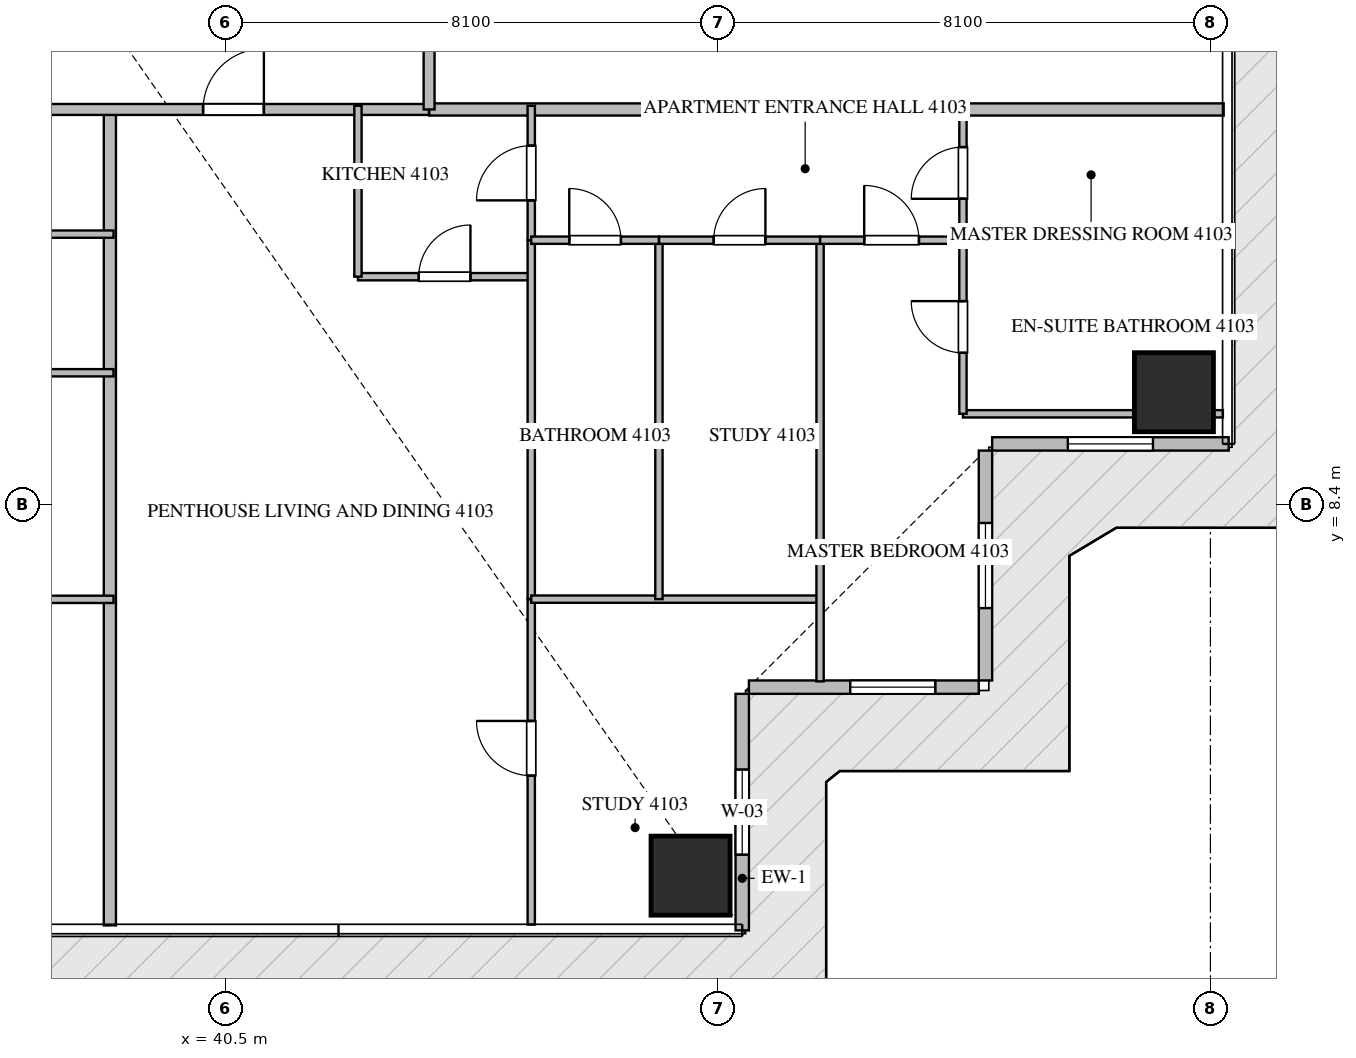
"""IFC4 building model, lengths in metres.
Left out: names, types, materials, properties, quantities, classifications, styles, units other than length and angle.
Written with IfcOpenShell. Run it as: python <this file> out.ifc"""

import sys

from ifc_helpers import new_model, si_unit, direction, frame, frame_2d, origin, origin_2d, place, context, subcontext, project, spatial, rectangle, extrude, source, transform, mapped, element, fill, save


model = new_model("IFC4")
c1 = context("Model", 3, precision=1e-05, world=origin(), true_north=direction((0.0, 1.0)))
c2 = subcontext(c1, "Body", "Model", "MODEL_VIEW")
j1 = project(units=[si_unit("LENGTHUNIT", "METRE"), si_unit("PLANEANGLEUNIT", "RADIAN")], contexts=[c1])
p1 = place(None, origin())
s1 = spatial("IfcSite", under=j1, at=p1, CompositionType="ELEMENT")
p2 = place(p1, origin())
s2 = spatial("IfcBuilding", under=s1, at=p2, CompositionType="ELEMENT")
p3 = place(p2, frame((0.0, 0.0, 165.15)))
s3 = spatial("IfcBuildingStorey", under=s2, at=p3, CompositionType="ELEMENT", Elevation=165.15)
m1 = source(origin(), c2, "Body", "SweptSolid", [
    extrude(rectangle(XDim=1.3, YDim=1.3, at=origin_2d()), origin(), (0.0, 0.0, 1.0), 3.75),
])
for number, where, z_axis, x_axis in (
    (1, (48.15, 2.3, -0.26), (0.0, 0.0, 1.0), (1.0, 0.0, 0.0)),
    (2, (56.1, 10.25, -0.26), (0.0, 0.0, 1.0), (1.0, 0.0, 0.0)),
):
    element("IfcColumn", number, at=place(p3, frame(where, z_axis=z_axis, x_axis=x_axis)), inside=s3, PredefinedType="COLUMN", context=c2, shape_type="MappedRepresentation", body=[
        mapped(m1, transform((0.0, 0.0, 0.0), scale=1.0)),
    ])
p4 = place(p3, frame((49.0, 1.4, 0.0), z_axis=(0.0, 0.0, 1.0), x_axis=(0.0, 1.0, 0.0)))
e3 = element("IfcWall", 3, at=p4, inside=s3, PredefinedType="ELEMENTEDWALL", context=c2, shape_type="SweptSolid", body=[
    extrude(rectangle(XDim=3.89, YDim=0.22, at=frame_2d((1.945, 0.0))), origin(), (0.0, 0.0, 1.0), 3.475),
])
p5 = place(p4, frame((1.245, 0.0, 0.65)))
e4 = element("IfcOpeningElement", 4, at=p5, cuts=e3, PredefinedType="OPENING", context=c2, shape_type="SweptSolid", body=[
    extrude(rectangle(XDim=1.4, YDim=2.05, at=frame_2d((0.7, 1.025))), frame((0.0, 0.12, 0.0), z_axis=(0.0, -1.0, 0.0), x_axis=(1.0, 0.0, 0.0)), (0.0, 0.0, 1.0), 0.24),
])
p6 = place(p3, frame((49.11, 5.4, 0.0), z_axis=(0.0, 0.0, 1.0), x_axis=(1.0, 0.0, 0.0)))
e5 = element("IfcWall", 5, at=p6, inside=s3, PredefinedType="ELEMENTEDWALL", context=c2, shape_type="SweptSolid", body=[
    extrude(rectangle(XDim=3.78, YDim=0.22, at=frame_2d((1.89, 0.0))), origin(), (0.0, 0.0, 1.0), 3.475),
])
p7 = place(p6, frame((1.666, 0.0, 0.65)))
e6 = element("IfcOpeningElement", 6, at=p7, cuts=e5, PredefinedType="OPENING", context=c2, shape_type="SweptSolid", body=[
    extrude(rectangle(XDim=1.4, YDim=2.05, at=frame_2d((0.7, 1.025))), frame((0.0, 0.12, 0.0), z_axis=(0.0, -1.0, 0.0), x_axis=(1.0, 0.0, 0.0)), (0.0, 0.0, 1.0), 0.24),
])
p8 = place(p3, frame((53.0, 5.51, 0.0), z_axis=(0.0, 0.0, 1.0), x_axis=(0.0, 1.0, 0.0)))
e7 = element("IfcWall", 7, at=p8, inside=s3, PredefinedType="ELEMENTEDWALL", context=c2, shape_type="SweptSolid", body=[
    extrude(rectangle(XDim=3.78, YDim=0.22, at=frame_2d((1.89, 0.0))), origin(), (0.0, 0.0, 1.0), 3.475),
])
p9 = place(p8, frame((1.19, 0.0, 0.65)))
e8 = element("IfcOpeningElement", 8, at=p9, cuts=e7, PredefinedType="OPENING", context=c2, shape_type="SweptSolid", body=[
    extrude(rectangle(XDim=1.4, YDim=2.05, at=frame_2d((0.7, 1.025))), frame((0.0, 0.12, 0.0), z_axis=(0.0, -1.0, 0.0), x_axis=(1.0, 0.0, 0.0)), (0.0, 0.0, 1.0), 0.24),
])
p10 = place(p3, frame((53.11, 9.4, 0.0), z_axis=(0.0, 0.0, 1.0), x_axis=(1.0, 0.0, 0.0)))
e9 = element("IfcWall", 9, at=p10, inside=s3, PredefinedType="ELEMENTEDWALL", context=c2, shape_type="SweptSolid", body=[
    extrude(rectangle(XDim=3.89, YDim=0.22, at=frame_2d((1.945, 0.0))), origin(), (0.0, 0.0, 1.0), 3.475),
])
p11 = place(p10, frame((1.245, 0.0, 0.65)))
e10 = element("IfcOpeningElement", 10, at=p11, cuts=e9, PredefinedType="OPENING", context=c2, shape_type="SweptSolid", body=[
    extrude(rectangle(XDim=1.4, YDim=2.05, at=frame_2d((0.7, 1.025))), frame((0.0, 0.12, 0.0), z_axis=(0.0, -1.0, 0.0), x_axis=(1.0, 0.0, 0.0)), (0.0, 0.0, 1.0), 0.24),
])
p12 = place(p3, frame((38.6, 1.482, 0.0), z_axis=(0.0, 0.0, 1.0), x_axis=(0.0, 1.0, 0.0)))
e11 = element("IfcWall", 11, at=p12, inside=s3, PredefinedType="PARTITIONING", context=c2, shape_type="SweptSolid", body=[
    extrude(rectangle(XDim=13.418, YDim=0.2, at=frame_2d((6.709, 0.0))), origin(), (0.0, 0.0, 1.0), 3.49),
])
p13 = place(p3, frame((43.85, 14.9, 0.0), z_axis=(0.0, 0.0, 1.0), x_axis=(1.0, 0.0, 0.0)))
e12 = element("IfcWall", 12, at=p13, inside=s3, PredefinedType="PARTITIONING", context=c2, shape_type="SweptSolid", body=[
    extrude(rectangle(XDim=13.068, YDim=0.2, at=frame_2d((6.534, 0.0))), origin(), (0.0, 0.0, 1.0), 3.49),
])
p14 = place(p3, frame((20.952, 14.9, 0.0), z_axis=(0.0, 0.0, 1.0), x_axis=(1.0, 0.0, 0.0)))
e13 = element("IfcWall", 13, at=p14, inside=s3, PredefinedType="PARTITIONING", context=c2, shape_type="SweptSolid", body=[
    extrude(rectangle(XDim=22.896, YDim=0.18, at=frame_2d((11.448, 0.0))), origin(), (0.0, 0.0, 1.0), 3.49),
])
p15 = place(p14, frame((2.387, 0.0, 0.0)))
e14 = element("IfcOpeningElement", 14, at=p15, cuts=e13, PredefinedType="OPENING", context=c2, shape_type="SweptSolid", body=[
    extrude(rectangle(XDim=1.0, YDim=2.15, at=frame_2d((0.5, 1.075))), frame((0.0, 0.1, 0.0), z_axis=(0.0, -1.0, 0.0), x_axis=(1.0, 0.0, 0.0)), (0.0, 0.0, 1.0), 0.2),
])
p16 = place(p14, frame((6.788, 0.0, 0.0)))
e15 = element("IfcOpeningElement", 15, at=p16, cuts=e13, PredefinedType="OPENING", context=c2, shape_type="SweptSolid", body=[
    extrude(rectangle(XDim=1.0, YDim=2.15, at=frame_2d((0.5, 1.075))), frame((0.0, 0.1, 0.0), z_axis=(0.0, -1.0, 0.0), x_axis=(1.0, 0.0, 0.0)), (0.0, 0.0, 1.0), 0.2),
])
p17 = place(p14, frame((19.181, 0.0, 0.0)))
e16 = element("IfcOpeningElement", 16, at=p17, cuts=e13, PredefinedType="OPENING", context=c2, shape_type="SweptSolid", body=[
    extrude(rectangle(XDim=1.0, YDim=2.15, at=frame_2d((0.5, 1.075))), frame((0.0, 0.1, 0.0), z_axis=(0.0, -1.0, 0.0), x_axis=(1.0, 0.0, 0.0)), (0.0, 0.0, 1.0), 0.2),
])
p18 = place(p3, frame((43.85, 14.9, 0.0), z_axis=(0.0, 0.0, 1.0), x_axis=(0.0, 1.0, 0.0)))
e17 = element("IfcWall", 17, at=p18, inside=s3, PredefinedType="PARTITIONING", context=c2, shape_type="SweptSolid", body=[
    extrude(rectangle(XDim=18.7, YDim=0.18, at=frame_2d((9.35, 0.0))), origin(), (0.0, 0.0, 1.0), 3.49),
])
p19 = place(p18, frame((1.805, 0.0, 0.0)))
e18 = element("IfcOpeningElement", 18, at=p19, cuts=e17, PredefinedType="OPENING", context=c2, shape_type="SweptSolid", body=[
    extrude(rectangle(XDim=1.0, YDim=2.15, at=frame_2d((0.5, 1.075))), frame((0.0, 0.1, 0.0), z_axis=(0.0, -1.0, 0.0), x_axis=(1.0, 0.0, 0.0)), (0.0, 0.0, 1.0), 0.2),
])
for number, where, z_axis, x_axis in (
    (19, (30.66, 6.844, 0.0), (0.0, 0.0, 1.0), (1.0, 0.0, 0.0)),
    (20, (30.66, 10.57, 0.0), (0.0, 0.0, 1.0), (1.0, 0.0, 0.0)),
    (21, (30.66, 12.85, 0.0), (0.0, 0.0, 1.0), (1.0, 0.0, 0.0)),
):
    element("IfcWall", number, at=place(p3, frame(where, z_axis=z_axis, x_axis=x_axis)), inside=s3, PredefinedType="PARTITIONING", context=c2, shape_type="SweptSolid", body=[
        extrude(rectangle(XDim=8.0, YDim=0.12, at=frame_2d((4.0, 0.0))), origin(), (0.0, 0.0, 1.0), 3.49),
    ])
p20 = place(p3, frame((42.68, 12.15, 0.0), z_axis=(0.0, 0.0, 1.0), x_axis=(1.0, 0.0, 0.0)))
e22 = element("IfcWall", 22, at=p20, inside=s3, PredefinedType="PARTITIONING", context=c2, shape_type="SweptSolid", body=[
    extrude(rectangle(XDim=2.85, YDim=0.12, at=frame_2d((1.425, 0.0))), origin(), (0.0, 0.0, 1.0), 3.49),
])
p21 = place(p20, frame((1.0, 0.0, 0.0)))
e23 = element("IfcOpeningElement", 23, at=p21, cuts=e22, PredefinedType="OPENING", context=c2, shape_type="SweptSolid", body=[
    extrude(rectangle(XDim=0.85, YDim=2.1, at=frame_2d((0.425, 1.05))), frame((0.0, 0.07, 0.0), z_axis=(0.0, -1.0, 0.0), x_axis=(1.0, 0.0, 0.0)), (0.0, 0.0, 1.0), 0.14),
])
p22 = place(p3, frame((42.68, 12.15, 0.0), z_axis=(0.0, 0.0, 1.0), x_axis=(0.0, 1.0, 0.0)))
e24 = element("IfcWall", 24, at=p22, inside=s3, PredefinedType="PARTITIONING", context=c2, shape_type="SweptSolid", body=[
    extrude(rectangle(XDim=2.81, YDim=0.12, at=frame_2d((1.405, 0.0))), origin(), (0.0, 0.0, 1.0), 3.49),
])
p23 = place(p3, frame((45.53, 12.75, 0.0), z_axis=(0.0, 0.0, 1.0), x_axis=(0.0, 1.0, 0.0)))
e25 = element("IfcWall", 25, at=p23, inside=s3, PredefinedType="PARTITIONING", context=c2, shape_type="SweptSolid", body=[
    extrude(rectangle(XDim=2.21, YDim=0.12, at=frame_2d((1.105, 0.0))), origin(), (0.0, 0.0, 1.0), 3.49),
])
p24 = place(p23, frame((0.655, 0.0, 0.0)))
e26 = element("IfcOpeningElement", 26, at=p24, cuts=e25, PredefinedType="OPENING", context=c2, shape_type="SweptSolid", body=[
    extrude(rectangle(XDim=0.9, YDim=2.1, at=frame_2d((0.45, 1.05))), frame((0.0, 0.07, 0.0), z_axis=(0.0, -1.0, 0.0), x_axis=(1.0, 0.0, 0.0)), (0.0, 0.0, 1.0), 0.14),
])
p25 = place(p3, frame((45.53, 1.495, 0.0), z_axis=(0.0, 0.0, 1.0), x_axis=(0.0, 1.0, 0.0)))
e27 = element("IfcWall", 27, at=p25, inside=s3, PredefinedType="PARTITIONING", context=c2, shape_type="SweptSolid", body=[
    extrude(rectangle(XDim=5.352, YDim=0.12, at=frame_2d((2.676, 0.0))), origin(), (0.0, 0.0, 1.0), 3.49),
])
p26 = place(p25, frame((2.449, 0.0, 0.0)))
e28 = element("IfcOpeningElement", 28, at=p26, cuts=e27, PredefinedType="OPENING", context=c2, shape_type="SweptSolid", body=[
    extrude(rectangle(XDim=0.9, YDim=2.1, at=frame_2d((0.45, 1.05))), frame((0.0, 0.07, 0.0), z_axis=(0.0, -1.0, 0.0), x_axis=(1.0, 0.0, 0.0)), (0.0, 0.0, 1.0), 0.14),
])
p27 = place(p3, frame((45.53, 6.849, 0.0), z_axis=(0.0, 0.0, 1.0), x_axis=(0.0, 1.0, 0.0)))
e29 = element("IfcWall", 29, at=p27, inside=s3, PredefinedType="PARTITIONING", context=c2, shape_type="SweptSolid", body=[
    extrude(rectangle(XDim=5.899, YDim=0.12, at=frame_2d((2.949, 0.0))), origin(), (0.0, 0.0, 1.0), 3.49),
])
p28 = place(p3, frame((45.53, 6.847, 0.0), z_axis=(0.0, 0.0, 1.0), x_axis=(1.0, 0.0, 0.0)))
e30 = element("IfcWall", 30, at=p28, inside=s3, PredefinedType="PARTITIONING", context=c2, shape_type="SweptSolid", body=[
    extrude(rectangle(XDim=4.75, YDim=0.12, at=frame_2d((2.375, 0.0))), origin(), (0.0, 0.0, 1.0), 3.49),
])
p29 = place(p3, frame((50.28, 5.495, 0.0), z_axis=(0.0, 0.0, 1.0), x_axis=(0.0, 1.0, 0.0)))
e31 = element("IfcWall", 31, at=p29, inside=s3, PredefinedType="PARTITIONING", context=c2, shape_type="SweptSolid", body=[
    extrude(rectangle(XDim=7.255, YDim=0.12, at=frame_2d((3.627, 0.0))), origin(), (0.0, 0.0, 1.0), 3.49),
])
p30 = place(p3, frame((47.63, 6.847, 0.0), z_axis=(0.0, 0.0, 1.0), x_axis=(0.0, 1.0, 0.0)))
e32 = element("IfcWall", 32, at=p30, inside=s3, PredefinedType="PARTITIONING", context=c2, shape_type="SweptSolid", body=[
    extrude(rectangle(XDim=5.903, YDim=0.12, at=frame_2d((2.952, 0.0))), origin(), (0.0, 0.0, 1.0), 3.49),
])
p31 = place(p3, frame((45.53, 12.75, 0.0), z_axis=(0.0, 0.0, 1.0), x_axis=(1.0, 0.0, 0.0)))
e33 = element("IfcWall", 33, at=p31, inside=s3, PredefinedType="PARTITIONING", context=c2, shape_type="SweptSolid", body=[
    extrude(rectangle(XDim=2.1, YDim=0.12, at=frame_2d((1.05, 0.0))), origin(), (0.0, 0.0, 1.0), 3.49),
])
p32 = place(p31, frame((0.625, 0.0, 0.0)))
e34 = element("IfcOpeningElement", 34, at=p32, cuts=e33, PredefinedType="OPENING", context=c2, shape_type="SweptSolid", body=[
    extrude(rectangle(XDim=0.85, YDim=2.1, at=frame_2d((0.425, 1.05))), frame((0.0, 0.07, 0.0), z_axis=(0.0, -1.0, 0.0), x_axis=(1.0, 0.0, 0.0)), (0.0, 0.0, 1.0), 0.14),
])
p33 = place(p3, frame((47.632, 12.75, 0.0), z_axis=(0.0, 0.0, 1.0), x_axis=(1.0, 0.0, 0.0)))
e35 = element("IfcWall", 35, at=p33, inside=s3, PredefinedType="PARTITIONING", context=c2, shape_type="SweptSolid", body=[
    extrude(rectangle(XDim=2.648, YDim=0.12, at=frame_2d((1.324, 0.0))), origin(), (0.0, 0.0, 1.0), 3.49),
])
p34 = place(p33, frame((0.899, 0.0, 0.0)))
e36 = element("IfcOpeningElement", 36, at=p34, cuts=e35, PredefinedType="OPENING", context=c2, shape_type="SweptSolid", body=[
    extrude(rectangle(XDim=0.85, YDim=2.1, at=frame_2d((0.425, 1.05))), frame((0.0, 0.07, 0.0), z_axis=(0.0, -1.0, 0.0), x_axis=(1.0, 0.0, 0.0)), (0.0, 0.0, 1.0), 0.14),
])
p35 = place(p3, frame((50.282, 12.75, 0.0), z_axis=(0.0, 0.0, 1.0), x_axis=(1.0, 0.0, 0.0)))
e37 = element("IfcWall", 37, at=p35, inside=s3, PredefinedType="PARTITIONING", context=c2, shape_type="SweptSolid", body=[
    extrude(rectangle(XDim=2.348, YDim=0.12, at=frame_2d((1.174, 0.0))), origin(), (0.0, 0.0, 1.0), 3.49),
])
p36 = place(p35, frame((0.724, 0.0, 0.0)))
e38 = element("IfcOpeningElement", 38, at=p36, cuts=e37, PredefinedType="OPENING", context=c2, shape_type="SweptSolid", body=[
    extrude(rectangle(XDim=0.9, YDim=2.1, at=frame_2d((0.45, 1.05))), frame((0.0, 0.07, 0.0), z_axis=(0.0, -1.0, 0.0), x_axis=(1.0, 0.0, 0.0)), (0.0, 0.0, 1.0), 0.14),
])
p37 = place(p3, frame((52.63, 9.895, 0.0), z_axis=(0.0, 0.0, 1.0), x_axis=(1.0, 0.0, 0.0)))
e39 = element("IfcWall", 39, at=p37, inside=s3, PredefinedType="PARTITIONING", context=c2, shape_type="SweptSolid", body=[
    extrude(rectangle(XDim=4.275, YDim=0.12, at=frame_2d((2.138, 0.0))), origin(), (0.0, 0.0, 1.0), 3.49),
])
p38 = place(p3, frame((52.632, 12.75, 0.0), z_axis=(0.0, 0.0, 1.0), x_axis=(1.0, 0.0, 0.0)))
e40 = element("IfcWall", 40, at=p38, inside=s3, PredefinedType="PARTITIONING", context=c2, shape_type="SweptSolid", body=[
    extrude(rectangle(XDim=4.273, YDim=0.12, at=frame_2d((2.136, 0.0))), origin(), (0.0, 0.0, 1.0), 3.49),
])
p39 = place(p3, frame((52.63, 9.895, 0.0), z_axis=(0.0, 0.0, 1.0), x_axis=(0.0, 1.0, 0.0)))
e41 = element("IfcWall", 41, at=p39, inside=s3, PredefinedType="PARTITIONING", context=c2, shape_type="SweptSolid", body=[
    extrude(rectangle(XDim=2.855, YDim=0.12, at=frame_2d((1.427, 0.0))), origin(), (0.0, 0.0, 1.0), 3.49),
])
p40 = place(p39, frame((1.003, 0.0, 0.0)))
e42 = element("IfcOpeningElement", 42, at=p40, cuts=e41, PredefinedType="OPENING", context=c2, shape_type="SweptSolid", body=[
    extrude(rectangle(XDim=0.85, YDim=2.1, at=frame_2d((0.425, 1.05))), frame((0.0, 0.07, 0.0), z_axis=(0.0, -1.0, 0.0), x_axis=(1.0, 0.0, 0.0)), (0.0, 0.0, 1.0), 0.14),
])
p41 = place(p3, frame((52.63, 12.752, 0.0), z_axis=(0.0, 0.0, 1.0), x_axis=(0.0, 1.0, 0.0)))
e43 = element("IfcWall", 43, at=p41, inside=s3, PredefinedType="PARTITIONING", context=c2, shape_type="SweptSolid", body=[
    extrude(rectangle(XDim=2.208, YDim=0.12, at=frame_2d((1.104, 0.0))), origin(), (0.0, 0.0, 1.0), 3.49),
])
p42 = place(p41, frame((0.679, 0.0, 0.0)))
e44 = element("IfcOpeningElement", 44, at=p42, cuts=e43, PredefinedType="OPENING", context=c2, shape_type="SweptSolid", body=[
    extrude(rectangle(XDim=0.85, YDim=2.1, at=frame_2d((0.425, 1.05))), frame((0.0, 0.07, 0.0), z_axis=(0.0, -1.0, 0.0), x_axis=(1.0, 0.0, 0.0)), (0.0, 0.0, 1.0), 0.14),
])
m2 = source(origin(), c2, "Body", "SweptSolid", [
    extrude(rectangle(XDim=1.4, YDim=2.05, at=frame_2d((0.7, 1.025))), frame((0.0, 0.03, 0.0), z_axis=(0.0, -1.0, 0.0), x_axis=(1.0, 0.0, 0.0)), (0.0, 0.0, 1.0), 0.06),
])
p43 = place(p5, origin())
e45 = element("IfcWindow", 45, at=p43, inside=s3, PartitioningType="SINGLE_PANEL", PredefinedType="WINDOW", context=c2, shape_type="MappedRepresentation", body=[
    mapped(m2, transform((0.0, 0.0, 0.0), scale=1.0)),
])
fill(e4, e45)
p44 = place(p7, origin())
e46 = element("IfcWindow", 46, at=p44, inside=s3, PartitioningType="SINGLE_PANEL", PredefinedType="WINDOW", context=c2, shape_type="MappedRepresentation", body=[
    mapped(m2, transform((0.0, 0.0, 0.0), scale=1.0)),
])
fill(e6, e46)
p45 = place(p9, origin())
e47 = element("IfcWindow", 47, at=p45, inside=s3, PartitioningType="SINGLE_PANEL", PredefinedType="WINDOW", context=c2, shape_type="MappedRepresentation", body=[
    mapped(m2, transform((0.0, 0.0, 0.0), scale=1.0)),
])
fill(e8, e47)
p46 = place(p11, origin())
e48 = element("IfcWindow", 48, at=p46, inside=s3, PartitioningType="SINGLE_PANEL", PredefinedType="WINDOW", context=c2, shape_type="MappedRepresentation", body=[
    mapped(m2, transform((0.0, 0.0, 0.0), scale=1.0)),
])
fill(e10, e48)
m3 = source(origin(), c2, "Body", "SweptSolid", [
    extrude(rectangle(XDim=1.0, YDim=2.15, at=frame_2d((0.5, 1.075))), frame((0.0, 0.025, 0.0), z_axis=(0.0, -1.0, 0.0), x_axis=(1.0, 0.0, 0.0)), (0.0, 0.0, 1.0), 0.05),
])
p47 = place(p17, origin())
e49 = element("IfcDoor", 49, at=p47, inside=s3, OperationType="SINGLE_SWING_RIGHT", PredefinedType="DOOR", context=c2, shape_type="MappedRepresentation", body=[
    mapped(m3, transform((0.0, 0.0, 0.0), scale=1.0)),
])
fill(e16, e49)
m4 = source(origin(), c2, "Body", "SweptSolid", [
    extrude(rectangle(XDim=0.85, YDim=2.1, at=frame_2d((0.425, 1.05))), frame((0.0, 0.025, 0.0), z_axis=(0.0, -1.0, 0.0), x_axis=(1.0, 0.0, 0.0)), (0.0, 0.0, 1.0), 0.05),
])
p48 = place(p21, origin())
e50 = element("IfcDoor", 50, at=p48, inside=s3, OperationType="SINGLE_SWING_RIGHT", PredefinedType="DOOR", context=c2, shape_type="MappedRepresentation", body=[
    mapped(m4, transform((0.0, 0.0, 0.0), scale=1.0)),
])
fill(e23, e50)
m5 = source(origin(), c2, "Body", "SweptSolid", [
    extrude(rectangle(XDim=0.9, YDim=2.1, at=frame_2d((0.45, 1.05))), frame((0.0, 0.025, 0.0), z_axis=(0.0, -1.0, 0.0), x_axis=(1.0, 0.0, 0.0)), (0.0, 0.0, 1.0), 0.05),
])
p49 = place(p24, origin())
e51 = element("IfcDoor", 51, at=p49, inside=s3, OperationType="SINGLE_SWING_LEFT", PredefinedType="DOOR", context=c2, shape_type="MappedRepresentation", body=[
    mapped(m5, transform((0.0, 0.0, 0.0), scale=1.0)),
])
fill(e26, e51)
p50 = place(p26, origin())
e52 = element("IfcDoor", 52, at=p50, inside=s3, OperationType="SINGLE_SWING_RIGHT", PredefinedType="DOOR", context=c2, shape_type="MappedRepresentation", body=[
    mapped(m5, transform((0.0, 0.0, 0.0), scale=1.0)),
])
fill(e28, e52)
p51 = place(p32, origin())
e53 = element("IfcDoor", 53, at=p51, inside=s3, OperationType="SINGLE_SWING_LEFT", PredefinedType="DOOR", context=c2, shape_type="MappedRepresentation", body=[
    mapped(m4, transform((0.0, 0.0, 0.0), scale=1.0)),
])
fill(e34, e53)
p52 = place(p34, origin())
e54 = element("IfcDoor", 54, at=p52, inside=s3, OperationType="SINGLE_SWING_RIGHT", PredefinedType="DOOR", context=c2, shape_type="MappedRepresentation", body=[
    mapped(m4, transform((0.0, 0.0, 0.0), scale=1.0)),
])
fill(e36, e54)
p53 = place(p36, origin())
e55 = element("IfcDoor", 55, at=p53, inside=s3, OperationType="SINGLE_SWING_LEFT", PredefinedType="DOOR", context=c2, shape_type="MappedRepresentation", body=[
    mapped(m5, transform((0.0, 0.0, 0.0), scale=1.0)),
])
fill(e38, e55)
p54 = place(p40, origin())
e56 = element("IfcDoor", 56, at=p54, inside=s3, OperationType="SINGLE_SWING_RIGHT", PredefinedType="DOOR", context=c2, shape_type="MappedRepresentation", body=[
    mapped(m4, transform((0.0, 0.0, 0.0), scale=1.0)),
])
fill(e42, e56)
p55 = place(p42, origin())
e57 = element("IfcDoor", 57, at=p55, inside=s3, OperationType="SINGLE_SWING_LEFT", PredefinedType="DOOR", context=c2, shape_type="MappedRepresentation", body=[
    mapped(m4, transform((0.0, 0.0, 0.0), scale=1.0)),
])
fill(e44, e57)
save(model, sys.argv[1])
